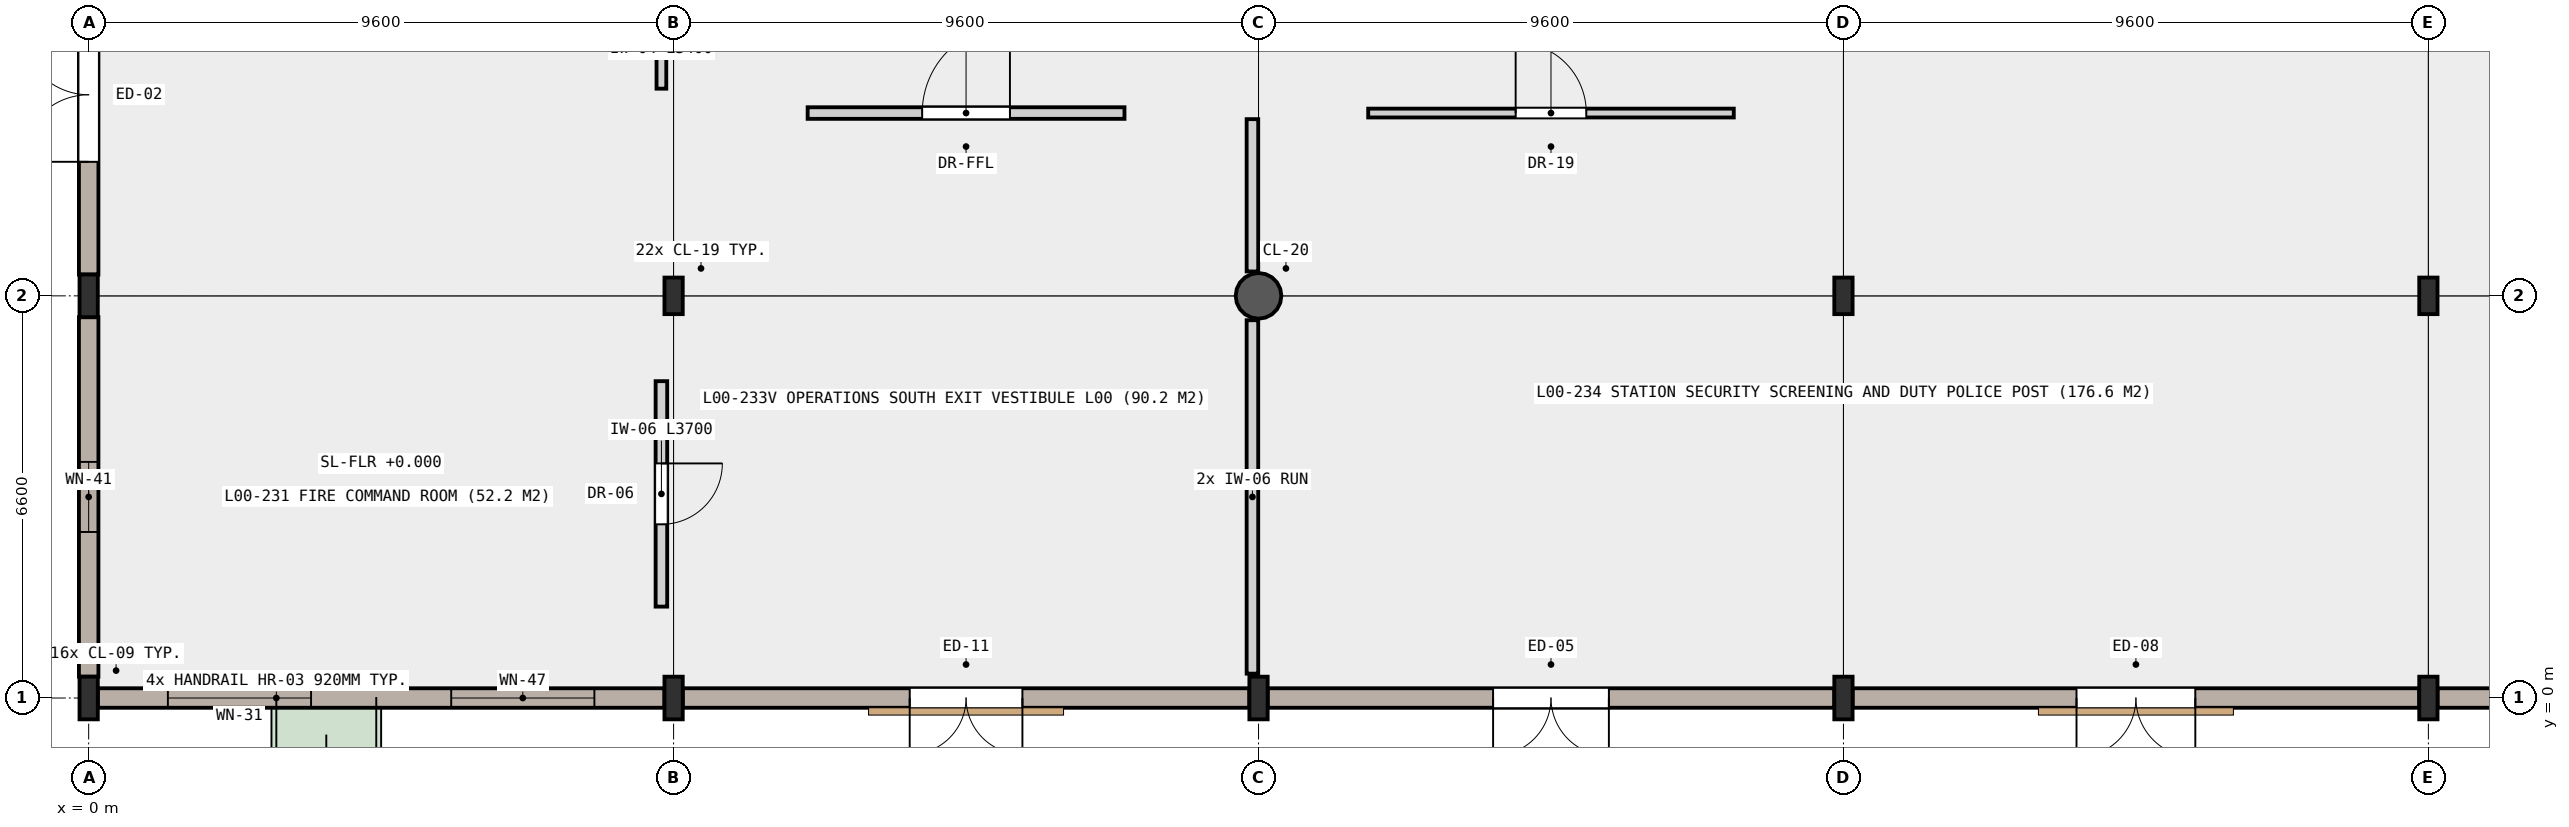
"""IFC4 building model, lengths in metres.
Left out: names, types, materials, properties, quantities, classifications, styles, units other than length and angle.
Written with IfcOpenShell. Run it as: python <this file> out.ifc"""

import sys

from ifc_helpers import new_model, si_unit, direction, frame, frame_2d, origin, origin_2d, place, context, subcontext, project, spatial, rectangle, circle, i_section, extrude, element, fill, save


model = new_model("IFC4")
c1 = context("Model", 3, precision=1e-05, world=origin(), true_north=direction((0.0, 1.0)))
c2 = subcontext(c1, "Body", "Model", "MODEL_VIEW")
j1 = project(units=[si_unit("LENGTHUNIT", "METRE"), si_unit("PLANEANGLEUNIT", "RADIAN")], contexts=[c1])
p1 = place(None, origin())
s1 = spatial("IfcSite", under=j1, at=p1, CompositionType="ELEMENT")
p2 = place(p1, origin())
s2 = spatial("IfcBuilding", under=s1, at=p2, CompositionType="ELEMENT")
p3 = place(p2, origin())
s3 = spatial("IfcBuildingStorey", under=s2, at=p3, CompositionType="ELEMENT", Elevation=0.0)
for number, where, z_axis, x_axis in (
    (1, (0.0, 0.0, 0.0), (0.0, 0.0, 1.0), (1.0, 0.0, 0.0)),
    (2, (0.0, 6.6, 0.0), (0.0, 0.0, 1.0), (1.0, 0.0, 0.0)),
    (3, (9.6, 0.0, 0.0), (0.0, 0.0, 1.0), (1.0, 0.0, 0.0)),
):
    element("IfcColumn", number, at=place(p3, frame(where, z_axis=z_axis, x_axis=x_axis)), inside=s3, PredefinedType="COLUMN", context=c2, shape_type="SweptSolid", body=[
        extrude(i_section(OverallWidth=0.3, OverallDepth=0.7, WebThickness=0.017, FlangeThickness=0.032, FilletRadius=0.027, at=origin_2d()), origin(), (0.0, 0.0, 1.0), 5.4),
    ])
p4 = place(p3, frame((9.6, 6.6, 0.0), z_axis=(0.0, 0.0, 1.0), x_axis=(1.0, 0.0, 0.0)))
e4 = element("IfcColumn", 4, at=p4, inside=s3, PredefinedType="COLUMN", context=c2, shape_type="SweptSolid", body=[
    extrude(i_section(OverallWidth=0.3, OverallDepth=0.6, WebThickness=0.015, FlangeThickness=0.03, FilletRadius=0.027, at=origin_2d()), origin(), (0.0, 0.0, 1.0), 5.4),
])
p5 = place(p3, frame((19.2, 0.0, 0.0), z_axis=(0.0, 0.0, 1.0), x_axis=(1.0, 0.0, 0.0)))
e5 = element("IfcColumn", 5, at=p5, inside=s3, PredefinedType="COLUMN", context=c2, shape_type="SweptSolid", body=[
    extrude(i_section(OverallWidth=0.3, OverallDepth=0.7, WebThickness=0.017, FlangeThickness=0.032, FilletRadius=0.027, at=origin_2d()), origin(), (0.0, 0.0, 1.0), 5.4),
])
p6 = place(p3, frame((19.2, 6.6, 0.0), z_axis=(0.0, 0.0, 1.0), x_axis=(1.0, 0.0, 0.0)))
e6 = element("IfcColumn", 6, at=p6, inside=s3, PredefinedType="COLUMN", context=c2, shape_type="SweptSolid", body=[
    extrude(circle(Radius=0.375, at=origin_2d()), origin(), (0.0, 0.0, 1.0), 5.4),
])
p7 = place(p3, frame((28.8, 0.0, 0.0), z_axis=(0.0, 0.0, 1.0), x_axis=(1.0, 0.0, 0.0)))
e7 = element("IfcColumn", 7, at=p7, inside=s3, PredefinedType="COLUMN", context=c2, shape_type="SweptSolid", body=[
    extrude(i_section(OverallWidth=0.3, OverallDepth=0.7, WebThickness=0.017, FlangeThickness=0.032, FilletRadius=0.027, at=origin_2d()), origin(), (0.0, 0.0, 1.0), 5.4),
])
p8 = place(p3, frame((28.8, 6.6, 0.0), z_axis=(0.0, 0.0, 1.0), x_axis=(1.0, 0.0, 0.0)))
e8 = element("IfcColumn", 8, at=p8, inside=s3, PredefinedType="COLUMN", context=c2, shape_type="SweptSolid", body=[
    extrude(i_section(OverallWidth=0.3, OverallDepth=0.6, WebThickness=0.015, FlangeThickness=0.03, FilletRadius=0.027, at=origin_2d()), origin(), (0.0, 0.0, 1.0), 5.4),
])
p9 = place(p3, frame((38.4, 0.0, 0.0), z_axis=(0.0, 0.0, 1.0), x_axis=(1.0, 0.0, 0.0)))
e9 = element("IfcColumn", 9, at=p9, inside=s3, PredefinedType="COLUMN", context=c2, shape_type="SweptSolid", body=[
    extrude(i_section(OverallWidth=0.3, OverallDepth=0.7, WebThickness=0.017, FlangeThickness=0.032, FilletRadius=0.027, at=origin_2d()), origin(), (0.0, 0.0, 1.0), 5.4),
])
p10 = place(p3, frame((38.4, 6.6, 0.0), z_axis=(0.0, 0.0, 1.0), x_axis=(1.0, 0.0, 0.0)))
e10 = element("IfcColumn", 10, at=p10, inside=s3, PredefinedType="COLUMN", context=c2, shape_type="SweptSolid", body=[
    extrude(i_section(OverallWidth=0.3, OverallDepth=0.6, WebThickness=0.015, FlangeThickness=0.03, FilletRadius=0.027, at=origin_2d()), origin(), (0.0, 0.0, 1.0), 5.4),
])
p11 = place(p3, frame((0.0, 0.35, 0.0), z_axis=(0.0, 0.0, 1.0), x_axis=(0.0, 1.0, 0.0)))
e11 = element("IfcWall", 11, at=p11, inside=s3, PredefinedType="SOLIDWALL", context=c2, shape_type="SweptSolid", body=[
    extrude(rectangle(XDim=5.9, YDim=0.32, at=frame_2d((2.95, 0.0))), origin(), (0.0, 0.0, 1.0), 4.69),
])
p12 = place(p11, frame((2.375, 0.0, 0.85)))
e12 = element("IfcOpeningElement", 12, at=p12, cuts=e11, PredefinedType="OPENING", context=c2, shape_type="SweptSolid", body=[
    extrude(rectangle(XDim=1.15, YDim=1.5, at=frame_2d((0.575, 0.75))), frame((0.0, 0.17, 0.0), z_axis=(0.0, -1.0, 0.0), x_axis=(1.0, 0.0, 0.0)), (0.0, 0.0, 1.0), 0.34),
])
p13 = place(p3, frame((0.0, 6.95, 0.0), z_axis=(0.0, 0.0, 1.0), x_axis=(0.0, 1.0, 0.0)))
e13 = element("IfcWall", 13, at=p13, inside=s3, PredefinedType="SOLIDWALL", context=c2, shape_type="SweptSolid", body=[
    extrude(rectangle(XDim=5.9, YDim=0.32, at=frame_2d((2.95, 0.0))), origin(), (0.0, 0.0, 1.0), 4.69),
])
p14 = place(p13, frame((1.85, 0.0, 0.0)))
e14 = element("IfcOpeningElement", 14, at=p14, cuts=e13, PredefinedType="OPENING", context=c2, shape_type="SweptSolid", body=[
    extrude(rectangle(XDim=2.2, YDim=2.55, at=frame_2d((1.1, 1.275))), frame((0.0, 0.17, 0.0), z_axis=(0.0, -1.0, 0.0), x_axis=(1.0, 0.0, 0.0)), (0.0, 0.0, 1.0), 0.34),
])
p15 = place(p3, frame((47.85, 0.0, 0.0), z_axis=(0.0, 0.0, 1.0), x_axis=(-1.0, 0.0, 0.0)))
e15 = element("IfcWall", 15, at=p15, inside=s3, PredefinedType="SOLIDWALL", context=c2, shape_type="SweptSolid", body=[
    extrude(rectangle(XDim=9.3, YDim=0.32, at=frame_2d((4.65, 0.0))), origin(), (0.0, 0.0, 1.0), 4.69),
])
p16 = place(p15, frame((1.225, 0.0, 0.85)))
e16 = element("IfcOpeningElement", 16, at=p16, cuts=e15, PredefinedType="OPENING", context=c2, shape_type="SweptSolid", body=[
    extrude(rectangle(XDim=2.2, YDim=1.85, at=frame_2d((1.1, 0.925))), frame((0.0, 0.17, 0.0), z_axis=(0.0, -1.0, 0.0), x_axis=(1.0, 0.0, 0.0)), (0.0, 0.0, 1.0), 0.34),
])
p17 = place(p15, frame((5.875, 0.0, 0.85)))
e17 = element("IfcOpeningElement", 17, at=p17, cuts=e15, PredefinedType="OPENING", context=c2, shape_type="SweptSolid", body=[
    extrude(rectangle(XDim=2.2, YDim=2.15, at=frame_2d((1.1, 1.075))), frame((0.0, 0.17, 0.0), z_axis=(0.0, -1.0, 0.0), x_axis=(1.0, 0.0, 0.0)), (0.0, 0.0, 1.0), 0.34),
])
p18 = place(p3, frame((38.25, 0.0, 0.0), z_axis=(0.0, 0.0, 1.0), x_axis=(-1.0, 0.0, 0.0)))
e18 = element("IfcWall", 18, at=p18, inside=s3, PredefinedType="SOLIDWALL", context=c2, shape_type="SweptSolid", body=[
    extrude(rectangle(XDim=9.3, YDim=0.32, at=frame_2d((4.65, 0.0))), origin(), (0.0, 0.0, 1.0), 4.69),
])
p19 = place(p18, frame((3.675, 0.0, 0.0)))
e19 = element("IfcOpeningElement", 19, at=p19, cuts=e18, PredefinedType="OPENING", context=c2, shape_type="SweptSolid", body=[
    extrude(rectangle(XDim=1.95, YDim=2.4, at=frame_2d((0.975, 1.2))), frame((0.0, 0.17, 0.0), z_axis=(0.0, -1.0, 0.0), x_axis=(1.0, 0.0, 0.0)), (0.0, 0.0, 1.0), 0.34),
])
p20 = place(p3, frame((28.65, 0.0, 0.0), z_axis=(0.0, 0.0, 1.0), x_axis=(-1.0, 0.0, 0.0)))
e20 = element("IfcWall", 20, at=p20, inside=s3, PredefinedType="SOLIDWALL", context=c2, shape_type="SweptSolid", body=[
    extrude(rectangle(XDim=9.3, YDim=0.32, at=frame_2d((4.65, 0.0))), origin(), (0.0, 0.0, 1.0), 4.69),
])
p21 = place(p20, frame((3.7, 0.0, 0.0)))
e21 = element("IfcOpeningElement", 21, at=p21, cuts=e20, PredefinedType="OPENING", context=c2, shape_type="SweptSolid", body=[
    extrude(rectangle(XDim=1.9, YDim=2.4, at=frame_2d((0.95, 1.2))), frame((0.0, 0.17, 0.0), z_axis=(0.0, -1.0, 0.0), x_axis=(1.0, 0.0, 0.0)), (0.0, 0.0, 1.0), 0.34),
])
p22 = place(p3, frame((19.05, 0.0, 0.0), z_axis=(0.0, 0.0, 1.0), x_axis=(-1.0, 0.0, 0.0)))
e22 = element("IfcWall", 22, at=p22, inside=s3, PredefinedType="SOLIDWALL", context=c2, shape_type="SweptSolid", body=[
    extrude(rectangle(XDim=9.3, YDim=0.32, at=frame_2d((4.65, 0.0))), origin(), (0.0, 0.0, 1.0), 4.69),
])
p23 = place(p22, frame((3.725, 0.0, 0.0)))
e23 = element("IfcOpeningElement", 23, at=p23, cuts=e22, PredefinedType="OPENING", context=c2, shape_type="SweptSolid", body=[
    extrude(rectangle(XDim=1.85, YDim=2.35, at=frame_2d((0.925, 1.175))), frame((0.0, 0.17, 0.0), z_axis=(0.0, -1.0, 0.0), x_axis=(1.0, 0.0, 0.0)), (0.0, 0.0, 1.0), 0.34),
])
p24 = place(p3, frame((9.45, 0.0, 0.0), z_axis=(0.0, 0.0, 1.0), x_axis=(-1.0, 0.0, 0.0)))
e24 = element("IfcWall", 24, at=p24, inside=s3, PredefinedType="SOLIDWALL", context=c2, shape_type="SweptSolid", body=[
    extrude(rectangle(XDim=9.3, YDim=0.32, at=frame_2d((4.65, 0.0))), origin(), (0.0, 0.0, 1.0), 4.69),
])
p25 = place(p24, frame((1.15, 0.0, 0.85)))
e25 = element("IfcOpeningElement", 25, at=p25, cuts=e24, PredefinedType="OPENING", context=c2, shape_type="SweptSolid", body=[
    extrude(rectangle(XDim=2.35, YDim=1.5, at=frame_2d((1.175, 0.75))), frame((0.0, 0.17, 0.0), z_axis=(0.0, -1.0, 0.0), x_axis=(1.0, 0.0, 0.0)), (0.0, 0.0, 1.0), 0.34),
])
p26 = place(p24, frame((5.8, 0.0, 0.85)))
e26 = element("IfcOpeningElement", 26, at=p26, cuts=e24, PredefinedType="OPENING", context=c2, shape_type="SweptSolid", body=[
    extrude(rectangle(XDim=2.35, YDim=1.85, at=frame_2d((1.175, 0.925))), frame((0.0, 0.17, 0.0), z_axis=(0.0, -1.0, 0.0), x_axis=(1.0, 0.0, 0.0)), (0.0, 0.0, 1.0), 0.34),
])
p27 = place(p3, frame((11.8, 9.6, 0.0), z_axis=(0.0, 0.0, 1.0), x_axis=(1.0, 0.0, 0.0)))
e27 = element("IfcWall", 27, at=p27, inside=s3, PredefinedType="PARTITIONING", context=c2, shape_type="SweptSolid", body=[
    extrude(rectangle(XDim=5.2, YDim=0.19, at=frame_2d((2.6, 0.0))), origin(), (0.0, 0.0, 1.0), 5.12),
])
p28 = place(p27, frame((1.88, 0.0, 0.0)))
e28 = element("IfcOpeningElement", 28, at=p28, cuts=e27, PredefinedType="OPENING", context=c2, shape_type="SweptSolid", body=[
    extrude(rectangle(XDim=1.44, YDim=2.18, at=frame_2d((0.72, 1.09))), frame((0.0, 0.105, 0.0), z_axis=(0.0, -1.0, 0.0), x_axis=(1.0, 0.0, 0.0)), (0.0, 0.0, 1.0), 0.21),
])
p29 = place(p3, frame((19.1, 6.2, 0.0), z_axis=(0.0, 0.0, 1.0), x_axis=(0.0, -1.0, 0.0)))
e29 = element("IfcWall", 29, at=p29, inside=s3, PredefinedType="PARTITIONING", context=c2, shape_type="SweptSolid", body=[
    extrude(rectangle(XDim=5.8, YDim=0.19, at=frame_2d((2.9, 0.0))), origin(), (0.0, 0.0, 1.0), 4.59),
])
p30 = place(p3, frame((19.1, 9.5, 0.0), z_axis=(0.0, 0.0, 1.0), x_axis=(0.0, -1.0, 0.0)))
e30 = element("IfcWall", 30, at=p30, inside=s3, PredefinedType="PARTITIONING", context=c2, shape_type="SweptSolid", body=[
    extrude(rectangle(XDim=2.5, YDim=0.19, at=frame_2d((1.25, 0.0))), origin(), (0.0, 0.0, 1.0), 4.59),
])
p31 = place(p3, frame((9.4, 5.2, 0.0), z_axis=(0.0, 0.0, 1.0), x_axis=(0.0, -1.0, 0.0)))
e31 = element("IfcWall", 31, at=p31, inside=s3, PredefinedType="PARTITIONING", context=c2, shape_type="SweptSolid", body=[
    extrude(rectangle(XDim=3.7, YDim=0.19, at=frame_2d((1.85, 0.0))), origin(), (0.0, 0.0, 1.0), 4.59),
])
p32 = place(p31, frame((1.35, 0.0, 0.0)))
e32 = element("IfcOpeningElement", 32, at=p32, cuts=e31, PredefinedType="OPENING", context=c2, shape_type="SweptSolid", body=[
    extrude(rectangle(XDim=1.0, YDim=2.12, at=frame_2d((0.5, 1.06))), frame((0.0, 0.105, 0.0), z_axis=(0.0, -1.0, 0.0), x_axis=(1.0, 0.0, 0.0)), (0.0, 0.0, 1.0), 0.21),
])
p33 = place(p3, frame((9.4, 13.4, 0.0), z_axis=(0.0, 0.0, 1.0), x_axis=(0.0, -1.0, 0.0)))
e33 = element("IfcWall", 33, at=p33, inside=s3, PredefinedType="PARTITIONING", context=c2, shape_type="SweptSolid", body=[
    extrude(rectangle(XDim=3.4, YDim=0.16, at=frame_2d((1.7, 0.0))), origin(), (0.0, 0.0, 1.0), 4.59),
])
p34 = place(p33, frame((1.14, 0.0, 0.0)))
e34 = element("IfcOpeningElement", 34, at=p34, cuts=e33, PredefinedType="OPENING", context=c2, shape_type="SweptSolid", body=[
    extrude(rectangle(XDim=1.12, YDim=2.15, at=frame_2d((0.56, 1.075))), frame((0.0, 0.09, 0.0), z_axis=(0.0, -1.0, 0.0), x_axis=(1.0, 0.0, 0.0)), (0.0, 0.0, 1.0), 0.18),
])
p35 = place(p3, frame((21.0, 9.6, 0.0), z_axis=(0.0, 0.0, 1.0), x_axis=(1.0, 0.0, 0.0)))
e35 = element("IfcWall", 35, at=p35, inside=s3, PredefinedType="PARTITIONING", context=c2, shape_type="SweptSolid", body=[
    extrude(rectangle(XDim=6.0, YDim=0.145, at=frame_2d((3.0, 0.0))), origin(), (0.0, 0.0, 1.0), 5.12),
])
p36 = place(p35, frame((2.42, 0.0, 0.0)))
e36 = element("IfcOpeningElement", 36, at=p36, cuts=e35, PredefinedType="OPENING", context=c2, shape_type="SweptSolid", body=[
    extrude(rectangle(XDim=1.16, YDim=2.15, at=frame_2d((0.58, 1.075))), frame((0.0, 0.083, 0.0), z_axis=(0.0, -1.0, 0.0), x_axis=(1.0, 0.0, 0.0)), (0.0, 0.0, 1.0), 0.165),
])
p37 = place(p12, origin())
e37 = element("IfcWindow", 37, at=p37, inside=s3, PartitioningType="SINGLE_PANEL", PredefinedType="WINDOW", context=c2, shape_type="SweptSolid", body=[
    extrude(rectangle(XDim=1.15, YDim=1.5, at=frame_2d((0.575, 0.75))), frame((0.0, 0.03, 0.0), z_axis=(0.0, -1.0, 0.0), x_axis=(1.0, 0.0, 0.0)), (0.0, 0.0, 1.0), 0.06),
])
fill(e12, e37)
p38 = place(p14, origin())
e38 = element("IfcDoor", 38, at=p38, inside=s3, OperationType="DOUBLE_DOOR_SINGLE_SWING", PredefinedType="DOOR", context=c2, shape_type="SweptSolid", body=[
    extrude(rectangle(XDim=2.2, YDim=2.55, at=frame_2d((1.1, 1.275))), frame((0.0, 0.025, 0.0), z_axis=(0.0, -1.0, 0.0), x_axis=(1.0, 0.0, 0.0)), (0.0, 0.0, 1.0), 0.05),
])
fill(e14, e38)
p39 = place(p19, origin())
e39 = element("IfcDoor", 39, at=p39, inside=s3, OperationType="DOUBLE_DOOR_SINGLE_SWING", PredefinedType="DOOR", context=c2, shape_type="SweptSolid", body=[
    extrude(rectangle(XDim=1.95, YDim=2.4, at=frame_2d((0.975, 1.2))), frame((0.0, 0.025, 0.0), z_axis=(0.0, -1.0, 0.0), x_axis=(1.0, 0.0, 0.0)), (0.0, 0.0, 1.0), 0.05),
])
fill(e19, e39)
p40 = place(p21, origin())
e40 = element("IfcDoor", 40, at=p40, inside=s3, OperationType="DOUBLE_DOOR_SINGLE_SWING", PredefinedType="DOOR", context=c2, shape_type="SweptSolid", body=[
    extrude(rectangle(XDim=1.9, YDim=2.4, at=frame_2d((0.95, 1.2))), frame((0.0, 0.025, 0.0), z_axis=(0.0, -1.0, 0.0), x_axis=(1.0, 0.0, 0.0)), (0.0, 0.0, 1.0), 0.05),
])
fill(e21, e40)
p41 = place(p23, origin())
e41 = element("IfcDoor", 41, at=p41, inside=s3, OperationType="DOUBLE_DOOR_SINGLE_SWING", PredefinedType="DOOR", context=c2, shape_type="SweptSolid", body=[
    extrude(rectangle(XDim=1.85, YDim=2.35, at=frame_2d((0.925, 1.175))), frame((0.0, 0.025, 0.0), z_axis=(0.0, -1.0, 0.0), x_axis=(1.0, 0.0, 0.0)), (0.0, 0.0, 1.0), 0.05),
])
fill(e23, e41)
p42 = place(p25, origin())
e42 = element("IfcWindow", 42, at=p42, inside=s3, PartitioningType="SINGLE_PANEL", PredefinedType="WINDOW", context=c2, shape_type="SweptSolid", body=[
    extrude(rectangle(XDim=2.35, YDim=1.5, at=frame_2d((1.175, 0.75))), frame((0.0, 0.03, 0.0), z_axis=(0.0, -1.0, 0.0), x_axis=(1.0, 0.0, 0.0)), (0.0, 0.0, 1.0), 0.06),
])
fill(e25, e42)
p43 = place(p26, origin())
e43 = element("IfcWindow", 43, at=p43, inside=s3, PartitioningType="SINGLE_PANEL", PredefinedType="WINDOW", context=c2, shape_type="SweptSolid", body=[
    extrude(rectangle(XDim=2.35, YDim=1.85, at=frame_2d((1.175, 0.925))), frame((0.0, 0.03, 0.0), z_axis=(0.0, -1.0, 0.0), x_axis=(1.0, 0.0, 0.0)), (0.0, 0.0, 1.0), 0.06),
])
fill(e26, e43)
p44 = place(p28, origin())
e44 = element("IfcDoor", 44, at=p44, inside=s3, OperationType="SINGLE_SWING_RIGHT", PredefinedType="DOOR", context=c2, shape_type="SweptSolid", body=[
    extrude(rectangle(XDim=1.44, YDim=2.18, at=frame_2d((0.72, 1.09))), frame((0.0, 0.025, 0.0), z_axis=(0.0, -1.0, 0.0), x_axis=(1.0, 0.0, 0.0)), (0.0, 0.0, 1.0), 0.05),
])
fill(e28, e44)
p45 = place(p32, origin())
e45 = element("IfcDoor", 45, at=p45, inside=s3, OperationType="SINGLE_SWING_LEFT", PredefinedType="DOOR", context=c2, shape_type="SweptSolid", body=[
    extrude(rectangle(XDim=1.0, YDim=2.12, at=frame_2d((0.5, 1.06))), frame((0.0, 0.025, 0.0), z_axis=(0.0, -1.0, 0.0), x_axis=(1.0, 0.0, 0.0)), (0.0, 0.0, 1.0), 0.05),
])
fill(e32, e45)
p46 = place(p36, origin())
e46 = element("IfcDoor", 46, at=p46, inside=s3, OperationType="SINGLE_SWING_LEFT", PredefinedType="DOOR", context=c2, shape_type="SweptSolid", body=[
    extrude(rectangle(XDim=1.16, YDim=2.15, at=frame_2d((0.58, 1.075))), frame((0.0, 0.025, 0.0), z_axis=(0.0, -1.0, 0.0), x_axis=(1.0, 0.0, 0.0)), (0.0, 0.0, 1.0), 0.05),
])
fill(e36, e46)
save(model, sys.argv[1])
